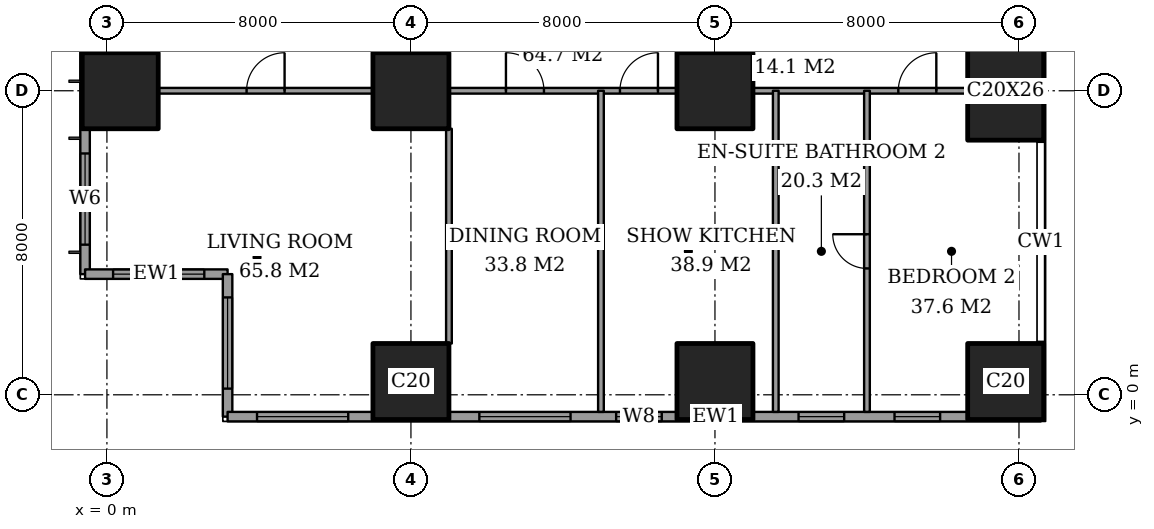
"""IFC4 building model, lengths in metres.
Left out: names, types, materials, properties, quantities, classifications, styles, units other than length and angle.
Written with IfcOpenShell. Run it as: python <this file> out.ifc"""

import sys

from ifc_helpers import new_model, si_unit, direction, frame, frame_2d, origin, origin_2d, place, context, subcontext, project, spatial, rectangle, extrude, element, fill, save


model = new_model("IFC4")
c1 = context("Model", 3, precision=1e-05, world=origin(), true_north=direction((0.0, 1.0)))
c2 = subcontext(c1, "Body", "Model", "MODEL_VIEW")
j1 = project(units=[si_unit("LENGTHUNIT", "METRE"), si_unit("PLANEANGLEUNIT", "RADIAN")], contexts=[c1])
p1 = place(None, origin())
s1 = spatial("IfcSite", under=j1, at=p1, CompositionType="ELEMENT")
p2 = place(p1, origin())
s2 = spatial("IfcBuilding", under=s1, at=p2, CompositionType="ELEMENT")
p3 = place(p2, frame((0.0, 0.0, 47.6)))
s3 = spatial("IfcBuildingStorey", under=s2, at=p3, CompositionType="ELEMENT", Elevation=47.6)
for number, where, z_axis, x_axis in (
    (1, (0.35, 8.0, 0.0), (0.0, 0.0, 1.0), (1.0, 0.0, 0.0)),
    (2, (8.0, 0.35, 0.0), (0.0, 0.0, 1.0), (1.0, 0.0, 0.0)),
    (3, (8.0, 8.0, 0.0), (0.0, 0.0, 1.0), (1.0, 0.0, 0.0)),
    (4, (16.0, 0.35, 0.0), (0.0, 0.0, 1.0), (1.0, 0.0, 0.0)),
    (5, (16.0, 8.0, 0.0), (0.0, 0.0, 1.0), (1.0, 0.0, 0.0)),
    (6, (23.65, 0.35, 0.0), (0.0, 0.0, 1.0), (1.0, 0.0, 0.0)),
):
    element("IfcColumn", number, at=place(p3, frame(where, z_axis=z_axis, x_axis=x_axis)), inside=s3, PredefinedType="COLUMN", context=c2, shape_type="SweptSolid", body=[
        extrude(rectangle(XDim=2.0, YDim=2.0, at=origin_2d()), origin(), (0.0, 0.0, 1.0), 3.6),
    ])
p4 = place(p3, frame((23.65, 8.0, 0.0), z_axis=(0.0, 0.0, 1.0), x_axis=(1.0, 0.0, 0.0)))
e7 = element("IfcColumn", 7, at=p4, inside=s3, PredefinedType="COLUMN", context=c2, shape_type="SweptSolid", body=[
    extrude(rectangle(XDim=2.0, YDim=2.6, at=origin_2d()), origin(), (0.0, 0.0, 1.0), 3.6),
])
p5 = place(p3, frame((-0.575, 44.825, 0.0), z_axis=(0.0, 0.0, 1.0), x_axis=(0.0, -1.0, 0.0)))
e8 = element("IfcWall", 8, at=p5, inside=s3, PredefinedType="SOLIDWALL", context=c2, shape_type="SweptSolid", body=[
    extrude(rectangle(XDim=41.65, YDim=0.25, at=frame_2d((20.825, 0.0))), origin(), (0.0, 0.0, 1.0), 3.6),
])
p6 = place(p5, frame((0.775, 0.0, 0.6)))
e9 = element("IfcOpeningElement", 9, at=p6, cuts=e8, PredefinedType="OPENING", context=c2, shape_type="SweptSolid", body=[
    extrude(rectangle(XDim=2.4, YDim=2.0, at=frame_2d((1.2, 1.0))), frame((0.0, 0.135, 0.0), z_axis=(0.0, -1.0, 0.0), x_axis=(1.0, 0.0, 0.0)), (0.0, 0.0, 1.0), 0.27),
])
p7 = place(p5, frame((6.1, 0.0, 0.6)))
e10 = element("IfcOpeningElement", 10, at=p7, cuts=e8, PredefinedType="OPENING", context=c2, shape_type="SweptSolid", body=[
    extrude(rectangle(XDim=1.2, YDim=2.0, at=frame_2d((0.6, 1.0))), frame((0.0, 0.135, 0.0), z_axis=(0.0, -1.0, 0.0), x_axis=(1.0, 0.0, 0.0)), (0.0, 0.0, 1.0), 0.27),
])
p8 = place(p5, frame((8.425, 0.0, 0.6)))
e11 = element("IfcOpeningElement", 11, at=p8, cuts=e8, PredefinedType="OPENING", context=c2, shape_type="SweptSolid", body=[
    extrude(rectangle(XDim=2.4, YDim=2.0, at=frame_2d((1.2, 1.0))), frame((0.0, 0.135, 0.0), z_axis=(0.0, -1.0, 0.0), x_axis=(1.0, 0.0, 0.0)), (0.0, 0.0, 1.0), 0.27),
])
p9 = place(p5, frame((15.625, 0.0, 0.6)))
e12 = element("IfcOpeningElement", 12, at=p9, cuts=e8, PredefinedType="OPENING", context=c2, shape_type="SweptSolid", body=[
    extrude(rectangle(XDim=2.4, YDim=2.0, at=frame_2d((1.2, 1.0))), frame((0.0, 0.135, 0.0), z_axis=(0.0, -1.0, 0.0), x_axis=(1.0, 0.0, 0.0)), (0.0, 0.0, 1.0), 0.27),
])
p10 = place(p5, frame((23.625, 0.0, 0.6)))
e13 = element("IfcOpeningElement", 13, at=p10, cuts=e8, PredefinedType="OPENING", context=c2, shape_type="SweptSolid", body=[
    extrude(rectangle(XDim=2.4, YDim=2.0, at=frame_2d((1.2, 1.0))), frame((0.0, 0.135, 0.0), z_axis=(0.0, -1.0, 0.0), x_axis=(1.0, 0.0, 0.0)), (0.0, 0.0, 1.0), 0.27),
])
p11 = place(p5, frame((30.825, 0.0, 0.6)))
e14 = element("IfcOpeningElement", 14, at=p11, cuts=e8, PredefinedType="OPENING", context=c2, shape_type="SweptSolid", body=[
    extrude(rectangle(XDim=2.4, YDim=2.0, at=frame_2d((1.2, 1.0))), frame((0.0, 0.135, 0.0), z_axis=(0.0, -1.0, 0.0), x_axis=(1.0, 0.0, 0.0)), (0.0, 0.0, 1.0), 0.27),
])
p12 = place(p5, frame((34.5, 0.0, 0.6)))
e15 = element("IfcOpeningElement", 15, at=p12, cuts=e8, PredefinedType="OPENING", context=c2, shape_type="SweptSolid", body=[
    extrude(rectangle(XDim=1.2, YDim=2.0, at=frame_2d((0.6, 1.0))), frame((0.0, 0.135, 0.0), z_axis=(0.0, -1.0, 0.0), x_axis=(1.0, 0.0, 0.0)), (0.0, 0.0, 1.0), 0.27),
])
p13 = place(p5, frame((38.475, 0.0, 0.6)))
e16 = element("IfcOpeningElement", 16, at=p13, cuts=e8, PredefinedType="OPENING", context=c2, shape_type="SweptSolid", body=[
    extrude(rectangle(XDim=2.4, YDim=2.0, at=frame_2d((1.2, 1.0))), frame((0.0, 0.135, 0.0), z_axis=(0.0, -1.0, 0.0), x_axis=(1.0, 0.0, 0.0)), (0.0, 0.0, 1.0), 0.27),
])
p14 = place(p3, frame((-0.575, 3.175, 0.0), z_axis=(0.0, 0.0, 1.0), x_axis=(1.0, 0.0, 0.0)))
e17 = element("IfcWall", 17, at=p14, inside=s3, PredefinedType="SOLIDWALL", context=c2, shape_type="SweptSolid", body=[
    extrude(rectangle(XDim=3.75, YDim=0.25, at=frame_2d((1.875, 0.0))), origin(), (0.0, 0.0, 1.0), 3.6),
])
p15 = place(p14, frame((0.738, 0.0, 0.6)))
e18 = element("IfcOpeningElement", 18, at=p15, cuts=e17, PredefinedType="OPENING", context=c2, shape_type="SweptSolid", body=[
    extrude(rectangle(XDim=2.4, YDim=2.0, at=frame_2d((1.2, 1.0))), frame((0.0, 0.135, 0.0), z_axis=(0.0, -1.0, 0.0), x_axis=(1.0, 0.0, 0.0)), (0.0, 0.0, 1.0), 0.27),
])
p16 = place(p3, frame((3.175, 3.175, 0.0), z_axis=(0.0, 0.0, 1.0), x_axis=(0.0, -1.0, 0.0)))
e19 = element("IfcWall", 19, at=p16, inside=s3, PredefinedType="SOLIDWALL", context=c2, shape_type="SweptSolid", body=[
    extrude(rectangle(XDim=3.75, YDim=0.25, at=frame_2d((1.875, 0.0))), origin(), (0.0, 0.0, 1.0), 3.6),
])
p17 = place(p16, frame((0.613, 0.0, 0.6)))
e20 = element("IfcOpeningElement", 20, at=p17, cuts=e19, PredefinedType="OPENING", context=c2, shape_type="SweptSolid", body=[
    extrude(rectangle(XDim=2.4, YDim=2.0, at=frame_2d((1.2, 1.0))), frame((0.0, 0.135, 0.0), z_axis=(0.0, -1.0, 0.0), x_axis=(1.0, 0.0, 0.0)), (0.0, 0.0, 1.0), 0.27),
])
p18 = place(p3, frame((3.175, -0.575, 0.0), z_axis=(0.0, 0.0, 1.0), x_axis=(1.0, 0.0, 0.0)))
e21 = element("IfcWall", 21, at=p18, inside=s3, PredefinedType="SOLIDWALL", context=c2, shape_type="SweptSolid", body=[
    extrude(rectangle(XDim=21.4, YDim=0.25, at=frame_2d((10.7, 0.0))), origin(), (0.0, 0.0, 1.0), 3.6),
])
p19 = place(p18, frame((0.775, 0.0, 0.6)))
e22 = element("IfcOpeningElement", 22, at=p19, cuts=e21, PredefinedType="OPENING", context=c2, shape_type="SweptSolid", body=[
    extrude(rectangle(XDim=2.4, YDim=2.0, at=frame_2d((1.2, 1.0))), frame((0.0, 0.135, 0.0), z_axis=(0.0, -1.0, 0.0), x_axis=(1.0, 0.0, 0.0)), (0.0, 0.0, 1.0), 0.27),
])
p20 = place(p18, frame((6.625, 0.0, 0.6)))
e23 = element("IfcOpeningElement", 23, at=p20, cuts=e21, PredefinedType="OPENING", context=c2, shape_type="SweptSolid", body=[
    extrude(rectangle(XDim=2.4, YDim=2.0, at=frame_2d((1.2, 1.0))), frame((0.0, 0.135, 0.0), z_axis=(0.0, -1.0, 0.0), x_axis=(1.0, 0.0, 0.0)), (0.0, 0.0, 1.0), 0.27),
])
p21 = place(p18, frame((10.225, 0.0, 0.6)))
e24 = element("IfcOpeningElement", 24, at=p21, cuts=e21, PredefinedType="OPENING", context=c2, shape_type="SweptSolid", body=[
    extrude(rectangle(XDim=1.2, YDim=2.0, at=frame_2d((0.6, 1.0))), frame((0.0, 0.135, 0.0), z_axis=(0.0, -1.0, 0.0), x_axis=(1.0, 0.0, 0.0)), (0.0, 0.0, 1.0), 0.27),
])
p22 = place(p18, frame((15.025, 0.0, 0.6)))
e25 = element("IfcOpeningElement", 25, at=p22, cuts=e21, PredefinedType="OPENING", context=c2, shape_type="SweptSolid", body=[
    extrude(rectangle(XDim=1.2, YDim=2.0, at=frame_2d((0.6, 1.0))), frame((0.0, 0.135, 0.0), z_axis=(0.0, -1.0, 0.0), x_axis=(1.0, 0.0, 0.0)), (0.0, 0.0, 1.0), 0.27),
])
p23 = place(p18, frame((17.55, 0.0, 0.6)))
e26 = element("IfcOpeningElement", 26, at=p23, cuts=e21, PredefinedType="OPENING", context=c2, shape_type="SweptSolid", body=[
    extrude(rectangle(XDim=1.2, YDim=2.0, at=frame_2d((0.6, 1.0))), frame((0.0, 0.135, 0.0), z_axis=(0.0, -1.0, 0.0), x_axis=(1.0, 0.0, 0.0)), (0.0, 0.0, 1.0), 0.27),
])
p24 = place(p3, frame((1.35, 8.0, 0.0), z_axis=(0.0, 0.0, 1.0), x_axis=(1.0, 0.0, 0.0)))
e27 = element("IfcWall", 27, at=p24, inside=s3, PredefinedType="PARTITIONING", context=c2, shape_type="SweptSolid", body=[
    extrude(rectangle(XDim=5.65, YDim=0.15, at=frame_2d((2.825, 0.0))), origin(), (0.0, 0.0, 1.0), 3.35),
])
p25 = place(p24, frame((2.325, 0.0, 0.0)))
e28 = element("IfcOpeningElement", 28, at=p25, cuts=e27, PredefinedType="OPENING", context=c2, shape_type="SweptSolid", body=[
    extrude(rectangle(XDim=1.0, YDim=2.1, at=frame_2d((0.5, 1.05))), frame((0.0, 0.085, 0.0), z_axis=(0.0, -1.0, 0.0), x_axis=(1.0, 0.0, 0.0)), (0.0, 0.0, 1.0), 0.17),
])
p26 = place(p3, frame((9.0, 8.0, 0.0), z_axis=(0.0, 0.0, 1.0), x_axis=(1.0, 0.0, 0.0)))
e29 = element("IfcWall", 29, at=p26, inside=s3, PredefinedType="PARTITIONING", context=c2, shape_type="SweptSolid", body=[
    extrude(rectangle(XDim=6.0, YDim=0.15, at=frame_2d((3.0, 0.0))), origin(), (0.0, 0.0, 1.0), 3.35),
])
p27 = place(p26, frame((1.5, 0.0, 0.0)))
e30 = element("IfcOpeningElement", 30, at=p27, cuts=e29, PredefinedType="OPENING", context=c2, shape_type="SweptSolid", body=[
    extrude(rectangle(XDim=1.0, YDim=2.1, at=frame_2d((0.5, 1.05))), frame((0.0, 0.085, 0.0), z_axis=(0.0, -1.0, 0.0), x_axis=(1.0, 0.0, 0.0)), (0.0, 0.0, 1.0), 0.17),
])
p28 = place(p26, frame((4.5, 0.0, 0.0)))
e31 = element("IfcOpeningElement", 31, at=p28, cuts=e29, PredefinedType="OPENING", context=c2, shape_type="SweptSolid", body=[
    extrude(rectangle(XDim=1.0, YDim=2.1, at=frame_2d((0.5, 1.05))), frame((0.0, 0.085, 0.0), z_axis=(0.0, -1.0, 0.0), x_axis=(1.0, 0.0, 0.0)), (0.0, 0.0, 1.0), 0.17),
])
p29 = place(p3, frame((17.0, 8.0, 0.0), z_axis=(0.0, 0.0, 1.0), x_axis=(1.0, 0.0, 0.0)))
e32 = element("IfcWall", 32, at=p29, inside=s3, PredefinedType="PARTITIONING", context=c2, shape_type="SweptSolid", body=[
    extrude(rectangle(XDim=5.65, YDim=0.15, at=frame_2d((2.825, 0.0))), origin(), (0.0, 0.0, 1.0), 3.35),
])
p30 = place(p29, frame((3.825, 0.0, 0.0)))
e33 = element("IfcOpeningElement", 33, at=p30, cuts=e32, PredefinedType="OPENING", context=c2, shape_type="SweptSolid", body=[
    extrude(rectangle(XDim=1.0, YDim=2.1, at=frame_2d((0.5, 1.05))), frame((0.0, 0.085, 0.0), z_axis=(0.0, -1.0, 0.0), x_axis=(1.0, 0.0, 0.0)), (0.0, 0.0, 1.0), 0.17),
])
p31 = place(p3, frame((9.0, 1.35, 0.0), z_axis=(0.0, 0.0, 1.0), x_axis=(0.0, 1.0, 0.0)))
e34 = element("IfcWall", 34, at=p31, inside=s3, PredefinedType="PARTITIONING", context=c2, shape_type="SweptSolid", body=[
    extrude(rectangle(XDim=5.65, YDim=0.15, at=frame_2d((2.825, 0.0))), origin(), (0.0, 0.0, 1.0), 3.35),
])
for number, where, z_axis, x_axis in (
    (35, (13.0, -0.45, 0.0), (0.0, 0.0, 1.0), (0.0, 1.0, 0.0)),
    (36, (17.6, -0.45, 0.0), (0.0, 0.0, 1.0), (0.0, 1.0, 0.0)),
):
    element("IfcWall", number, at=place(p3, frame(where, z_axis=z_axis, x_axis=x_axis)), inside=s3, PredefinedType="PARTITIONING", context=c2, shape_type="SweptSolid", body=[
        extrude(rectangle(XDim=8.45, YDim=0.15, at=frame_2d((4.225, 0.0))), origin(), (0.0, 0.0, 1.0), 3.35),
    ])
p32 = place(p3, frame((20.0, -0.45, 0.0), z_axis=(0.0, 0.0, 1.0), x_axis=(0.0, 1.0, 0.0)))
e37 = element("IfcWall", 37, at=p32, inside=s3, PredefinedType="PARTITIONING", context=c2, shape_type="SweptSolid", body=[
    extrude(rectangle(XDim=8.45, YDim=0.15, at=frame_2d((4.225, 0.0))), origin(), (0.0, 0.0, 1.0), 3.35),
])
p33 = place(p32, frame((3.775, 0.0, 0.0)))
e38 = element("IfcOpeningElement", 38, at=p33, cuts=e37, PredefinedType="OPENING", context=c2, shape_type="SweptSolid", body=[
    extrude(rectangle(XDim=0.9, YDim=2.1, at=frame_2d((0.45, 1.05))), frame((0.0, 0.085, 0.0), z_axis=(0.0, -1.0, 0.0), x_axis=(1.0, 0.0, 0.0)), (0.0, 0.0, 1.0), 0.17),
])
p34 = place(p13, origin())
e39 = element("IfcWindow", 39, at=p34, inside=s3, PartitioningType="SINGLE_PANEL", PredefinedType="WINDOW", context=c2, shape_type="SweptSolid", body=[
    extrude(rectangle(XDim=2.4, YDim=2.0, at=frame_2d((1.2, 1.0))), frame((0.0, 0.03, 0.0), z_axis=(0.0, -1.0, 0.0), x_axis=(1.0, 0.0, 0.0)), (0.0, 0.0, 1.0), 0.06),
])
fill(e16, e39)
p35 = place(p15, origin())
e40 = element("IfcWindow", 40, at=p35, inside=s3, PartitioningType="SINGLE_PANEL", PredefinedType="WINDOW", context=c2, shape_type="SweptSolid", body=[
    extrude(rectangle(XDim=2.4, YDim=2.0, at=frame_2d((1.2, 1.0))), frame((0.0, 0.03, 0.0), z_axis=(0.0, -1.0, 0.0), x_axis=(1.0, 0.0, 0.0)), (0.0, 0.0, 1.0), 0.06),
])
fill(e18, e40)
p36 = place(p17, origin())
e41 = element("IfcWindow", 41, at=p36, inside=s3, PartitioningType="SINGLE_PANEL", PredefinedType="WINDOW", context=c2, shape_type="SweptSolid", body=[
    extrude(rectangle(XDim=2.4, YDim=2.0, at=frame_2d((1.2, 1.0))), frame((0.0, 0.03, 0.0), z_axis=(0.0, -1.0, 0.0), x_axis=(1.0, 0.0, 0.0)), (0.0, 0.0, 1.0), 0.06),
])
fill(e20, e41)
p37 = place(p19, origin())
e42 = element("IfcWindow", 42, at=p37, inside=s3, PartitioningType="SINGLE_PANEL", PredefinedType="WINDOW", context=c2, shape_type="SweptSolid", body=[
    extrude(rectangle(XDim=2.4, YDim=2.0, at=frame_2d((1.2, 1.0))), frame((0.0, 0.03, 0.0), z_axis=(0.0, -1.0, 0.0), x_axis=(1.0, 0.0, 0.0)), (0.0, 0.0, 1.0), 0.06),
])
fill(e22, e42)
p38 = place(p20, origin())
e43 = element("IfcWindow", 43, at=p38, inside=s3, PartitioningType="SINGLE_PANEL", PredefinedType="WINDOW", context=c2, shape_type="SweptSolid", body=[
    extrude(rectangle(XDim=2.4, YDim=2.0, at=frame_2d((1.2, 1.0))), frame((0.0, 0.03, 0.0), z_axis=(0.0, -1.0, 0.0), x_axis=(1.0, 0.0, 0.0)), (0.0, 0.0, 1.0), 0.06),
])
fill(e23, e43)
p39 = place(p21, origin())
e44 = element("IfcWindow", 44, at=p39, inside=s3, PartitioningType="SINGLE_PANEL", PredefinedType="WINDOW", context=c2, shape_type="SweptSolid", body=[
    extrude(rectangle(XDim=1.2, YDim=2.0, at=frame_2d((0.6, 1.0))), frame((0.0, 0.03, 0.0), z_axis=(0.0, -1.0, 0.0), x_axis=(1.0, 0.0, 0.0)), (0.0, 0.0, 1.0), 0.06),
])
fill(e24, e44)
p40 = place(p22, origin())
e45 = element("IfcWindow", 45, at=p40, inside=s3, PartitioningType="SINGLE_PANEL", PredefinedType="WINDOW", context=c2, shape_type="SweptSolid", body=[
    extrude(rectangle(XDim=1.2, YDim=2.0, at=frame_2d((0.6, 1.0))), frame((0.0, 0.03, 0.0), z_axis=(0.0, -1.0, 0.0), x_axis=(1.0, 0.0, 0.0)), (0.0, 0.0, 1.0), 0.06),
])
fill(e25, e45)
p41 = place(p23, origin())
e46 = element("IfcWindow", 46, at=p41, inside=s3, PartitioningType="SINGLE_PANEL", PredefinedType="WINDOW", context=c2, shape_type="SweptSolid", body=[
    extrude(rectangle(XDim=1.2, YDim=2.0, at=frame_2d((0.6, 1.0))), frame((0.0, 0.03, 0.0), z_axis=(0.0, -1.0, 0.0), x_axis=(1.0, 0.0, 0.0)), (0.0, 0.0, 1.0), 0.06),
])
fill(e26, e46)
p42 = place(p25, origin())
e47 = element("IfcDoor", 47, at=p42, inside=s3, OperationType="SINGLE_SWING_LEFT", PredefinedType="DOOR", context=c2, shape_type="SweptSolid", body=[
    extrude(rectangle(XDim=1.0, YDim=2.1, at=frame_2d((0.5, 1.05))), frame((0.0, 0.025, 0.0), z_axis=(0.0, -1.0, 0.0), x_axis=(1.0, 0.0, 0.0)), (0.0, 0.0, 1.0), 0.05),
])
fill(e28, e47)
p43 = place(p27, origin())
e48 = element("IfcDoor", 48, at=p43, inside=s3, OperationType="SINGLE_SWING_RIGHT", PredefinedType="DOOR", context=c2, shape_type="SweptSolid", body=[
    extrude(rectangle(XDim=1.0, YDim=2.1, at=frame_2d((0.5, 1.05))), frame((0.0, 0.025, 0.0), z_axis=(0.0, -1.0, 0.0), x_axis=(1.0, 0.0, 0.0)), (0.0, 0.0, 1.0), 0.05),
])
fill(e30, e48)
p44 = place(p28, origin())
e49 = element("IfcDoor", 49, at=p44, inside=s3, OperationType="SINGLE_SWING_LEFT", PredefinedType="DOOR", context=c2, shape_type="SweptSolid", body=[
    extrude(rectangle(XDim=1.0, YDim=2.1, at=frame_2d((0.5, 1.05))), frame((0.0, 0.025, 0.0), z_axis=(0.0, -1.0, 0.0), x_axis=(1.0, 0.0, 0.0)), (0.0, 0.0, 1.0), 0.05),
])
fill(e31, e49)
p45 = place(p33, origin())
e50 = element("IfcDoor", 50, at=p45, inside=s3, OperationType="SINGLE_SWING_LEFT", PredefinedType="DOOR", context=c2, shape_type="SweptSolid", body=[
    extrude(rectangle(XDim=0.9, YDim=2.1, at=frame_2d((0.45, 1.05))), frame((0.0, 0.025, 0.0), z_axis=(0.0, -1.0, 0.0), x_axis=(1.0, 0.0, 0.0)), (0.0, 0.0, 1.0), 0.05),
])
fill(e38, e50)
p46 = place(p30, origin())
e51 = element("IfcDoor", 51, at=p46, inside=s3, OperationType="SINGLE_SWING_LEFT", PredefinedType="DOOR", context=c2, shape_type="SweptSolid", body=[
    extrude(rectangle(XDim=1.0, YDim=2.1, at=frame_2d((0.5, 1.05))), frame((0.0, 0.025, 0.0), z_axis=(0.0, -1.0, 0.0), x_axis=(1.0, 0.0, 0.0)), (0.0, 0.0, 1.0), 0.05),
])
fill(e33, e51)
save(model, sys.argv[1])
